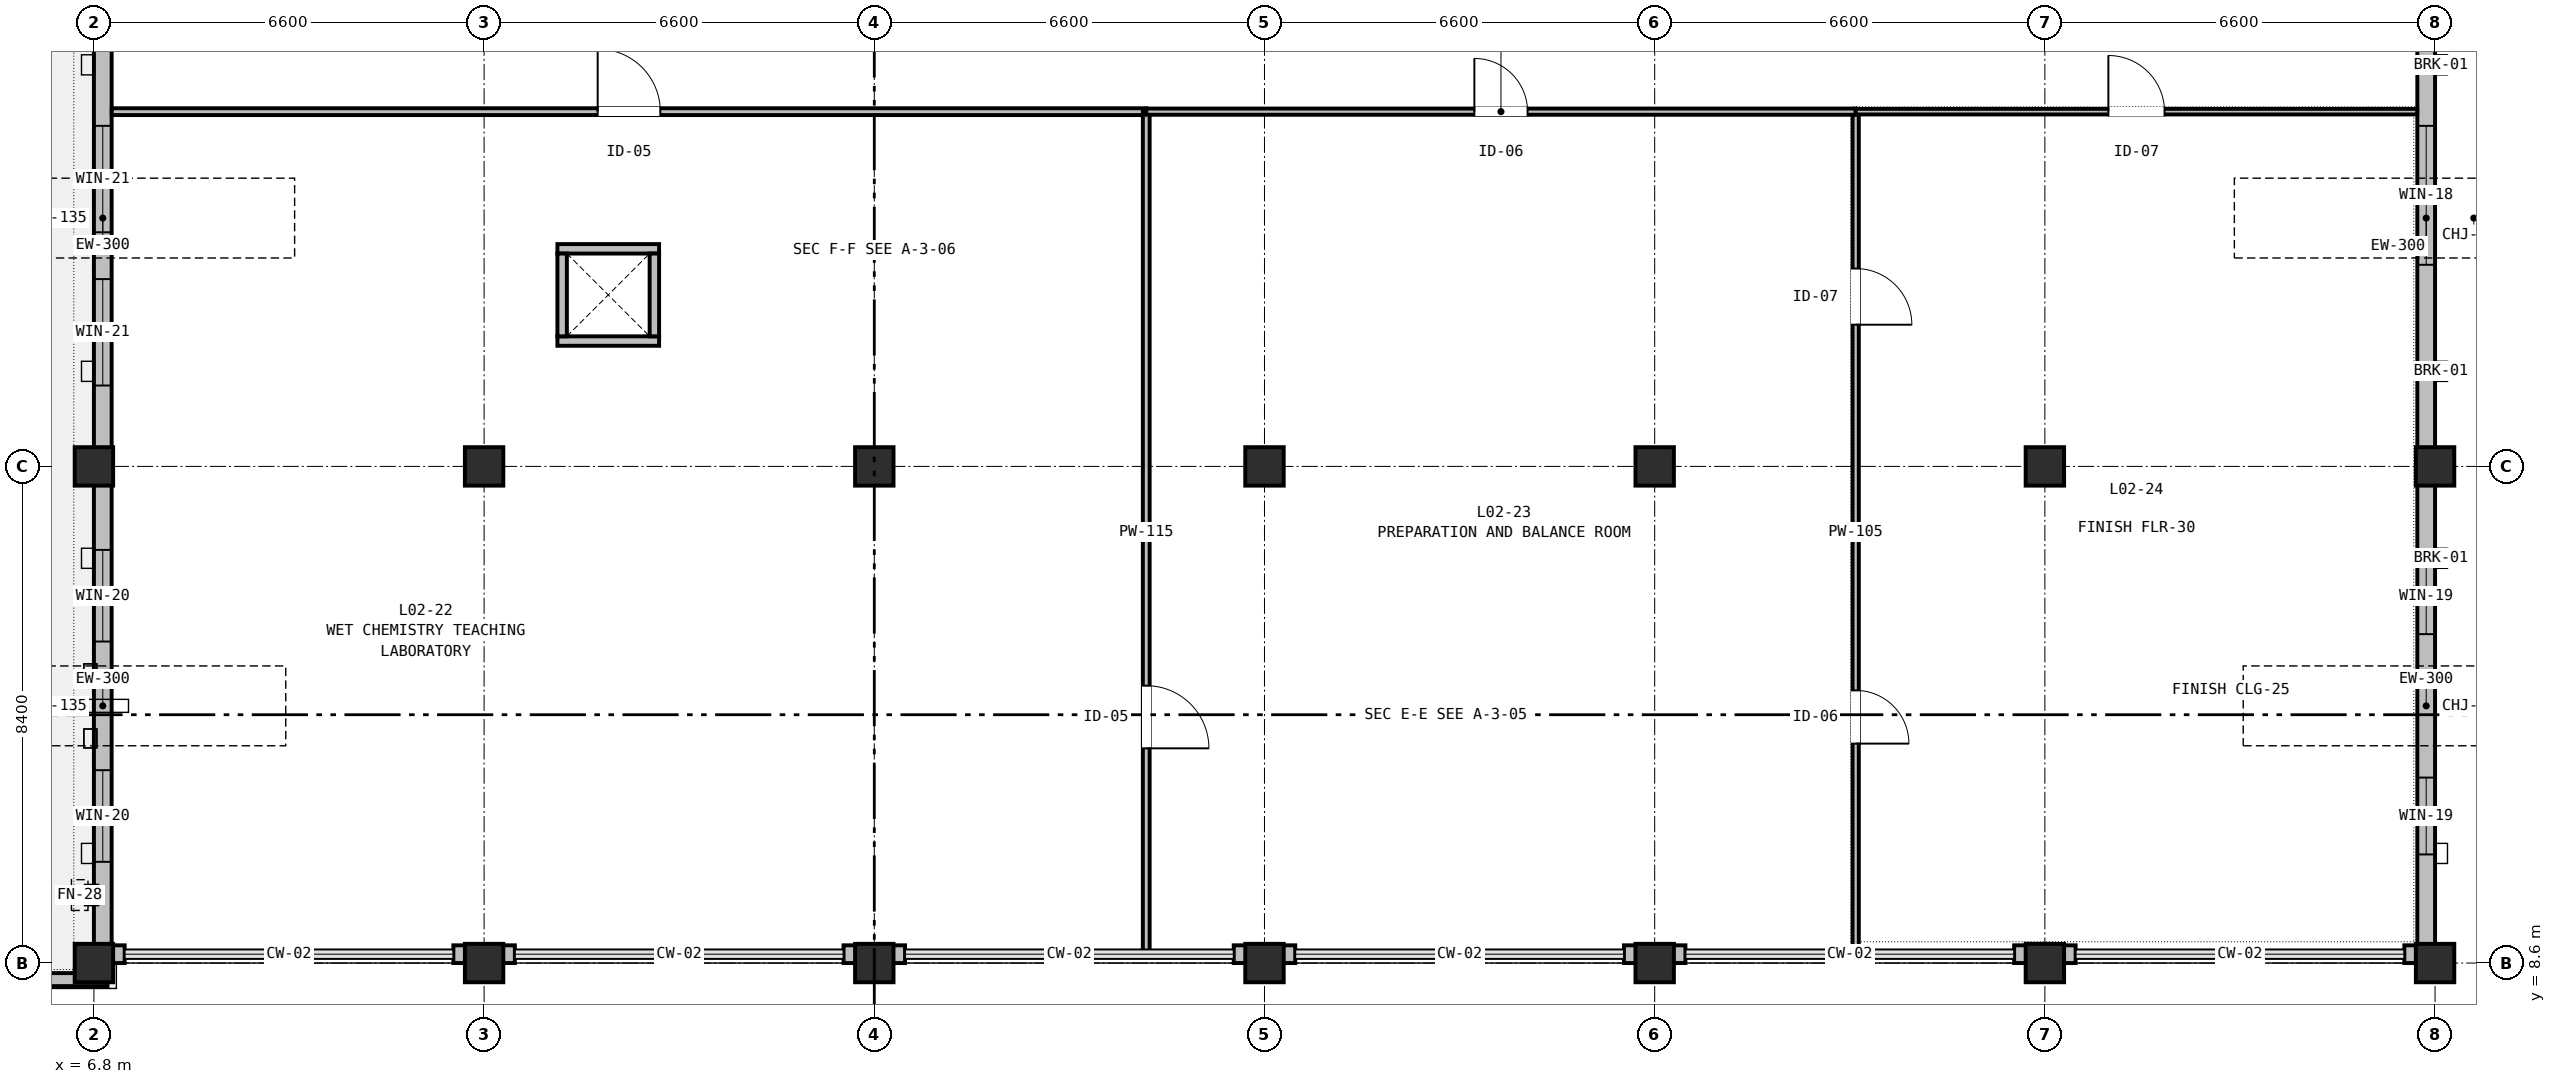
"""IFC4 building model, lengths in metres.
Left out: names, types, materials, properties, quantities, classifications, styles, units other than length and angle.
Written with IfcOpenShell. Run it as: python <this file> out.ifc"""

import sys

from ifc_helpers import new_model, si_unit, direction, frame, frame_2d, origin, origin_2d, place, context, subcontext, project, spatial, rectangle, extrude, element, fill, save


model = new_model("IFC4")
c1 = context("Model", 3, precision=1e-05, world=origin(), true_north=direction((0.0, 1.0)))
c2 = subcontext(c1, "Body", "Model", "MODEL_VIEW")
j1 = project(units=[si_unit("LENGTHUNIT", "METRE"), si_unit("PLANEANGLEUNIT", "RADIAN")], contexts=[c1])
p1 = place(None, origin())
s1 = spatial("IfcSite", under=j1, at=p1, CompositionType="ELEMENT")
p2 = place(p1, origin())
s2 = spatial("IfcBuilding", under=s1, at=p2, CompositionType="ELEMENT")
p3 = place(p2, frame((0.0, 0.0, 10.2)))
s3 = spatial("IfcBuildingStorey", under=s2, at=p3, CompositionType="ELEMENT", Elevation=10.2)
for number, where, z_axis, x_axis in (
    (1, (6.8, 8.6, 0.0), (0.0, 0.0, 1.0), (1.0, 0.0, 0.0)),
    (2, (6.8, 17.0, 0.0), (0.0, 0.0, 1.0), (1.0, 0.0, 0.0)),
    (3, (13.4, 8.6, 0.0), (0.0, 0.0, 1.0), (1.0, 0.0, 0.0)),
    (4, (13.4, 17.0, 0.0), (0.0, 0.0, 1.0), (1.0, 0.0, 0.0)),
    (5, (20.0, 8.6, 0.0), (0.0, 0.0, 1.0), (1.0, 0.0, 0.0)),
    (6, (20.0, 17.0, 0.0), (0.0, 0.0, 1.0), (1.0, 0.0, 0.0)),
    (7, (26.6, 8.6, 0.0), (0.0, 0.0, 1.0), (1.0, 0.0, 0.0)),
    (8, (26.6, 17.0, 0.0), (0.0, 0.0, 1.0), (1.0, 0.0, 0.0)),
    (9, (33.2, 8.6, 0.0), (0.0, 0.0, 1.0), (1.0, 0.0, 0.0)),
    (10, (33.2, 17.0, 0.0), (0.0, 0.0, 1.0), (1.0, 0.0, 0.0)),
    (11, (39.8, 8.6, 0.0), (0.0, 0.0, 1.0), (1.0, 0.0, 0.0)),
    (12, (39.8, 17.0, 0.0), (0.0, 0.0, 1.0), (1.0, 0.0, 0.0)),
):
    element("IfcColumn", number, at=place(p3, frame(where, z_axis=z_axis, x_axis=x_axis)), inside=s3, PredefinedType="COLUMN", context=c2, shape_type="SweptSolid", body=[
        extrude(rectangle(XDim=0.65, YDim=0.65, at=origin_2d()), origin(), (0.0, 0.0, 1.0), 4.8),
    ])
for number, where, z_axis, x_axis in (
    (13, (46.4, 8.6, 0.0), (0.0, 0.0, 1.0), (1.0, 0.0, 0.0)),
    (14, (46.4, 17.0, 0.0), (0.0, 0.0, 1.0), (1.0, 0.0, 0.0)),
):
    element("IfcColumn", number, at=place(p3, frame(where, z_axis=z_axis, x_axis=x_axis)), inside=s3, PredefinedType="COLUMN", context=c2, shape_type="SweptSolid", body=[
        extrude(rectangle(XDim=0.65, YDim=0.65, at=origin_2d()), origin(), (0.0, 0.0, 1.0), 4.74),
    ])
p4 = place(p3, frame((46.25, 25.4, 0.0), z_axis=(0.0, 0.0, 1.0), x_axis=(0.0, -1.0, 0.0)))
e15 = element("IfcWall", 15, at=p4, inside=s3, PredefinedType="STANDARD", context=c2, shape_type="SweptSolid", body=[
    extrude(rectangle(XDim=8.4, YDim=0.3, at=frame_2d((4.2, 0.0))), origin(), (0.0, 0.0, 1.0), 4.085),
])
p5 = place(p4, frame((2.64, 0.0, 0.9)))
e16 = element("IfcOpeningElement", 16, at=p5, cuts=e15, PredefinedType="OPENING", context=c2, shape_type="SweptSolid", body=[
    extrude(rectangle(XDim=2.35, YDim=1.5, at=frame_2d((1.175, 0.75))), frame((0.0, 0.16, 0.0), z_axis=(0.0, -1.0, 0.0), x_axis=(1.0, 0.0, 0.0)), (0.0, 0.0, 1.0), 0.32),
])
p6 = place(p3, frame((46.25, 17.0, 0.0), z_axis=(0.0, 0.0, 1.0), x_axis=(0.0, -1.0, 0.0)))
e17 = element("IfcWall", 17, at=p6, inside=s3, PredefinedType="STANDARD", context=c2, shape_type="SweptSolid", body=[
    extrude(rectangle(XDim=8.1, YDim=0.3, at=frame_2d((4.05, 0.0))), origin(), (0.0, 0.0, 1.0), 4.085),
])
p7 = place(p6, frame((1.537, 0.0, 0.75)))
e18 = element("IfcOpeningElement", 18, at=p7, cuts=e17, PredefinedType="OPENING", context=c2, shape_type="SweptSolid", body=[
    extrude(rectangle(XDim=1.3, YDim=2.4, at=frame_2d((0.65, 1.2))), frame((0.0, 0.16, 0.0), z_axis=(0.0, -1.0, 0.0), x_axis=(1.0, 0.0, 0.0)), (0.0, 0.0, 1.0), 0.32),
])
p8 = place(p6, frame((5.263, 0.0, 0.75)))
e19 = element("IfcOpeningElement", 19, at=p8, cuts=e17, PredefinedType="OPENING", context=c2, shape_type="SweptSolid", body=[
    extrude(rectangle(XDim=1.3, YDim=2.4, at=frame_2d((0.65, 1.2))), frame((0.0, 0.16, 0.0), z_axis=(0.0, -1.0, 0.0), x_axis=(1.0, 0.0, 0.0)), (0.0, 0.0, 1.0), 0.32),
])
for number, where, z_axis, x_axis in (
    (20, (46.4, 8.75, 0.0), (0.0, 0.0, 1.0), (-1.0, 0.0, 0.0)),
    (21, (40.32, 8.75, 0.0), (0.0, 0.0, 1.0), (-1.0, 0.0, 0.0)),
    (22, (39.8, 8.75, 0.0), (0.0, 0.0, 1.0), (-1.0, 0.0, 0.0)),
    (23, (33.72, 8.75, 0.0), (0.0, 0.0, 1.0), (-1.0, 0.0, 0.0)),
    (24, (33.2, 8.75, 0.0), (0.0, 0.0, 1.0), (-1.0, 0.0, 0.0)),
    (25, (27.12, 8.75, 0.0), (0.0, 0.0, 1.0), (-1.0, 0.0, 0.0)),
    (26, (26.6, 8.75, 0.0), (0.0, 0.0, 1.0), (-1.0, 0.0, 0.0)),
    (27, (20.52, 8.75, 0.0), (0.0, 0.0, 1.0), (-1.0, 0.0, 0.0)),
    (28, (20.0, 8.75, 0.0), (0.0, 0.0, 1.0), (-1.0, 0.0, 0.0)),
    (29, (13.92, 8.75, 0.0), (0.0, 0.0, 1.0), (-1.0, 0.0, 0.0)),
    (30, (13.4, 8.75, 0.0), (0.0, 0.0, 1.0), (-1.0, 0.0, 0.0)),
    (31, (7.32, 8.75, 0.0), (0.0, 0.0, 1.0), (-1.0, 0.0, 0.0)),
):
    element("IfcWall", number, at=place(p3, frame(where, z_axis=z_axis, x_axis=x_axis)), inside=s3, PredefinedType="STANDARD", context=c2, shape_type="SweptSolid", body=[
        extrude(rectangle(XDim=0.52, YDim=0.3, at=frame_2d((0.26, 0.0))), origin(), (0.0, 0.0, 1.0), 3.935),
    ])
p9 = place(p3, frame((6.95, 8.9, 0.0), z_axis=(0.0, 0.0, 1.0), x_axis=(0.0, 1.0, 0.0)))
e32 = element("IfcWall", 32, at=p9, inside=s3, PredefinedType="STANDARD", context=c2, shape_type="SweptSolid", body=[
    extrude(rectangle(XDim=8.1, YDim=0.3, at=frame_2d((4.05, 0.0))), origin(), (0.0, 0.0, 1.0), 4.085),
])
p10 = place(p9, frame((1.412, 0.0, 0.75)))
e33 = element("IfcOpeningElement", 33, at=p10, cuts=e32, PredefinedType="OPENING", context=c2, shape_type="SweptSolid", body=[
    extrude(rectangle(XDim=1.55, YDim=2.4, at=frame_2d((0.775, 1.2))), frame((0.0, 0.16, 0.0), z_axis=(0.0, -1.0, 0.0), x_axis=(1.0, 0.0, 0.0)), (0.0, 0.0, 1.0), 0.32),
])
p11 = place(p9, frame((5.138, 0.0, 0.75)))
e34 = element("IfcOpeningElement", 34, at=p11, cuts=e32, PredefinedType="OPENING", context=c2, shape_type="SweptSolid", body=[
    extrude(rectangle(XDim=1.55, YDim=2.4, at=frame_2d((0.775, 1.2))), frame((0.0, 0.16, 0.0), z_axis=(0.0, -1.0, 0.0), x_axis=(1.0, 0.0, 0.0)), (0.0, 0.0, 1.0), 0.32),
])
p12 = place(p3, frame((6.95, 17.0, 0.0), z_axis=(0.0, 0.0, 1.0), x_axis=(0.0, 1.0, 0.0)))
e35 = element("IfcWall", 35, at=p12, inside=s3, PredefinedType="STANDARD", context=c2, shape_type="SweptSolid", body=[
    extrude(rectangle(XDim=8.4, YDim=0.3, at=frame_2d((4.2, 0.0))), origin(), (0.0, 0.0, 1.0), 4.085),
])
p13 = place(p12, frame((1.368, 0.0, 0.75)))
e36 = element("IfcOpeningElement", 36, at=p13, cuts=e35, PredefinedType="OPENING", context=c2, shape_type="SweptSolid", body=[
    extrude(rectangle(XDim=1.8, YDim=2.4, at=frame_2d((0.9, 1.2))), frame((0.0, 0.16, 0.0), z_axis=(0.0, -1.0, 0.0), x_axis=(1.0, 0.0, 0.0)), (0.0, 0.0, 1.0), 0.32),
])
p14 = place(p12, frame((3.96, 0.0, 0.75)))
e37 = element("IfcOpeningElement", 37, at=p14, cuts=e35, PredefinedType="OPENING", context=c2, shape_type="SweptSolid", body=[
    extrude(rectangle(XDim=1.8, YDim=2.4, at=frame_2d((0.9, 1.2))), frame((0.0, 0.16, 0.0), z_axis=(0.0, -1.0, 0.0), x_axis=(1.0, 0.0, 0.0)), (0.0, 0.0, 1.0), 0.32),
])
p15 = place(p3, frame((7.03, 8.32, 0.0), z_axis=(0.0, 0.0, 1.0), x_axis=(-1.0, 0.0, 0.0)))
e38 = element("IfcWall", 38, at=p15, inside=s3, PredefinedType="PARAPET", context=c2, shape_type="SweptSolid", body=[
    extrude(rectangle(XDim=7.31, YDim=0.22, at=frame_2d((3.655, 0.0))), origin(), (0.0, 0.0, 1.0), 0.68),
])
for number, where, z_axis, x_axis in (
    (39, (14.64, 19.12, 0.0), (0.0, 0.0, 1.0), (1.0, 0.0, 0.0)),
    (40, (14.64, 20.68, 0.0), (0.0, 0.0, 1.0), (1.0, 0.0, 0.0)),
):
    element("IfcWall", number, at=place(p3, frame(where, z_axis=z_axis, x_axis=x_axis)), inside=s3, PredefinedType="PARTITIONING", context=c2, shape_type="SweptSolid", body=[
        extrude(rectangle(XDim=1.72, YDim=0.16, at=frame_2d((0.86, 0.0))), origin(), (0.0, 0.0, 1.0), 4.495),
    ])
for number, where, z_axis, x_axis in (
    (41, (14.72, 19.2, 0.0), (0.0, 0.0, 1.0), (0.0, 1.0, 0.0)),
    (42, (16.28, 19.2, 0.0), (0.0, 0.0, 1.0), (0.0, 1.0, 0.0)),
):
    element("IfcWall", number, at=place(p3, frame(where, z_axis=z_axis, x_axis=x_axis)), inside=s3, PredefinedType="PARTITIONING", context=c2, shape_type="SweptSolid", body=[
        extrude(rectangle(XDim=1.4, YDim=0.16, at=frame_2d((0.7, 0.0))), origin(), (0.0, 0.0, 1.0), 4.495),
    ])
p16 = place(p3, frame((7.102, 23.0, 0.0), z_axis=(0.0, 0.0, 1.0), x_axis=(1.0, 0.0, 0.0)))
e43 = element("IfcWall", 43, at=p16, inside=s3, PredefinedType="PARTITIONING", context=c2, shape_type="SweptSolid", body=[
    extrude(rectangle(XDim=17.498, YDim=0.115, at=frame_2d((8.749, 0.0))), origin(), (0.0, 0.0, 1.0), 3.935),
])
p17 = place(p16, frame((8.219, 0.0, 0.0)))
e44 = element("IfcOpeningElement", 44, at=p17, cuts=e43, PredefinedType="OPENING", context=c2, shape_type="SweptSolid", body=[
    extrude(rectangle(XDim=1.06, YDim=2.02, at=frame_2d((0.53, 1.01))), frame((0.0, 0.067, 0.0), z_axis=(0.0, -1.0, 0.0), x_axis=(1.0, 0.0, 0.0)), (0.0, 0.0, 1.0), 0.135),
])
p18 = place(p3, frame((24.6, 23.0, 0.0), z_axis=(0.0, 0.0, 1.0), x_axis=(0.0, -1.0, 0.0)))
e45 = element("IfcWall", 45, at=p18, inside=s3, PredefinedType="PARTITIONING", context=c2, shape_type="SweptSolid", body=[
    extrude(rectangle(XDim=14.22, YDim=0.115, at=frame_2d((7.11, 0.0))), origin(), (0.0, 0.0, 1.0), 4.085),
])
p19 = place(p18, frame((9.708, 0.0, 0.0)))
e46 = element("IfcOpeningElement", 46, at=p19, cuts=e45, PredefinedType="OPENING", context=c2, shape_type="SweptSolid", body=[
    extrude(rectangle(XDim=1.06, YDim=2.02, at=frame_2d((0.53, 1.01))), frame((0.0, 0.067, 0.0), z_axis=(0.0, -1.0, 0.0), x_axis=(1.0, 0.0, 0.0)), (0.0, 0.0, 1.0), 0.135),
])
p20 = place(p3, frame((36.6, 23.0, 0.0), z_axis=(0.0, 0.0, 1.0), x_axis=(0.0, -1.0, 0.0)))
e47 = element("IfcWall", 47, at=p20, inside=s3, PredefinedType="PARTITIONING", context=c2, shape_type="SweptSolid", body=[
    extrude(rectangle(XDim=14.22, YDim=0.105, at=frame_2d((7.11, 0.0))), origin(), (0.0, 0.0, 1.0), 4.085),
])
p21 = place(p20, frame((9.788, 0.0, 0.0)))
e48 = element("IfcOpeningElement", 48, at=p21, cuts=e47, PredefinedType="OPENING", context=c2, shape_type="SweptSolid", body=[
    extrude(rectangle(XDim=0.9, YDim=2.06, at=frame_2d((0.45, 1.03))), frame((0.0, 0.062, 0.0), z_axis=(0.0, -1.0, 0.0), x_axis=(1.0, 0.0, 0.0)), (0.0, 0.0, 1.0), 0.125),
])
p22 = place(p20, frame((2.653, 0.0, 0.0)))
e49 = element("IfcOpeningElement", 49, at=p22, cuts=e47, PredefinedType="OPENING", context=c2, shape_type="SweptSolid", body=[
    extrude(rectangle(XDim=0.95, YDim=2.06, at=frame_2d((0.475, 1.03))), frame((0.0, 0.062, 0.0), z_axis=(0.0, -1.0, 0.0), x_axis=(1.0, 0.0, 0.0)), (0.0, 0.0, 1.0), 0.125),
])
p23 = place(p3, frame((24.6, 23.0, 0.0), z_axis=(0.0, 0.0, 1.0), x_axis=(1.0, 0.0, 0.0)))
e50 = element("IfcWall", 50, at=p23, inside=s3, PredefinedType="PARTITIONING", context=c2, shape_type="SweptSolid", body=[
    extrude(rectangle(XDim=12.0, YDim=0.105, at=frame_2d((6.0, 0.0))), origin(), (0.0, 0.0, 1.0), 3.935),
])
p24 = place(p23, frame((5.55, 0.0, 0.0)))
e51 = element("IfcOpeningElement", 51, at=p24, cuts=e50, PredefinedType="OPENING", context=c2, shape_type="SweptSolid", body=[
    extrude(rectangle(XDim=0.9, YDim=2.06, at=frame_2d((0.45, 1.03))), frame((0.0, 0.062, 0.0), z_axis=(0.0, -1.0, 0.0), x_axis=(1.0, 0.0, 0.0)), (0.0, 0.0, 1.0), 0.125),
])
p25 = place(p3, frame((36.6, 23.0, 0.0), z_axis=(0.0, 0.0, 1.0), x_axis=(1.0, 0.0, 0.0)))
e52 = element("IfcWall", 52, at=p25, inside=s3, PredefinedType="PARTITIONING", context=c2, shape_type="SweptSolid", body=[
    extrude(rectangle(XDim=9.498, YDim=0.095, at=frame_2d((4.749, 0.0))), origin(), (0.0, 0.0, 1.0), 3.935),
])
p26 = place(p25, frame((4.274, 0.0, 0.0)))
e53 = element("IfcOpeningElement", 53, at=p26, cuts=e52, PredefinedType="OPENING", context=c2, shape_type="SweptSolid", body=[
    extrude(rectangle(XDim=0.95, YDim=2.06, at=frame_2d((0.475, 1.03))), frame((0.0, 0.057, 0.0), z_axis=(0.0, -1.0, 0.0), x_axis=(1.0, 0.0, 0.0)), (0.0, 0.0, 1.0), 0.115),
])
p27 = place(p5, origin())
e54 = element("IfcWindow", 54, at=p27, inside=s3, PartitioningType="SINGLE_PANEL", PredefinedType="WINDOW", context=c2, shape_type="SweptSolid", body=[
    extrude(rectangle(XDim=2.35, YDim=1.5, at=frame_2d((1.175, 0.75))), frame((0.0, 0.03, 0.0), z_axis=(0.0, -1.0, 0.0), x_axis=(1.0, 0.0, 0.0)), (0.0, 0.0, 1.0), 0.06),
])
fill(e16, e54)
p28 = place(p7, origin())
e55 = element("IfcWindow", 55, at=p28, inside=s3, PartitioningType="SINGLE_PANEL", PredefinedType="WINDOW", context=c2, shape_type="SweptSolid", body=[
    extrude(rectangle(XDim=1.3, YDim=2.4, at=frame_2d((0.65, 1.2))), frame((0.0, 0.03, 0.0), z_axis=(0.0, -1.0, 0.0), x_axis=(1.0, 0.0, 0.0)), (0.0, 0.0, 1.0), 0.06),
])
fill(e18, e55)
p29 = place(p8, origin())
e56 = element("IfcWindow", 56, at=p29, inside=s3, PartitioningType="SINGLE_PANEL", PredefinedType="WINDOW", context=c2, shape_type="SweptSolid", body=[
    extrude(rectangle(XDim=1.3, YDim=2.4, at=frame_2d((0.65, 1.2))), frame((0.0, 0.03, 0.0), z_axis=(0.0, -1.0, 0.0), x_axis=(1.0, 0.0, 0.0)), (0.0, 0.0, 1.0), 0.06),
])
fill(e19, e56)
p30 = place(p10, origin())
e57 = element("IfcWindow", 57, at=p30, inside=s3, PartitioningType="SINGLE_PANEL", PredefinedType="WINDOW", context=c2, shape_type="SweptSolid", body=[
    extrude(rectangle(XDim=1.55, YDim=2.4, at=frame_2d((0.775, 1.2))), frame((0.0, 0.03, 0.0), z_axis=(0.0, -1.0, 0.0), x_axis=(1.0, 0.0, 0.0)), (0.0, 0.0, 1.0), 0.06),
])
fill(e33, e57)
p31 = place(p11, origin())
e58 = element("IfcWindow", 58, at=p31, inside=s3, PartitioningType="SINGLE_PANEL", PredefinedType="WINDOW", context=c2, shape_type="SweptSolid", body=[
    extrude(rectangle(XDim=1.55, YDim=2.4, at=frame_2d((0.775, 1.2))), frame((0.0, 0.03, 0.0), z_axis=(0.0, -1.0, 0.0), x_axis=(1.0, 0.0, 0.0)), (0.0, 0.0, 1.0), 0.06),
])
fill(e34, e58)
p32 = place(p13, origin())
e59 = element("IfcWindow", 59, at=p32, inside=s3, PartitioningType="SINGLE_PANEL", PredefinedType="WINDOW", context=c2, shape_type="SweptSolid", body=[
    extrude(rectangle(XDim=1.8, YDim=2.4, at=frame_2d((0.9, 1.2))), frame((0.0, 0.03, 0.0), z_axis=(0.0, -1.0, 0.0), x_axis=(1.0, 0.0, 0.0)), (0.0, 0.0, 1.0), 0.06),
])
fill(e36, e59)
p33 = place(p14, origin())
e60 = element("IfcWindow", 60, at=p33, inside=s3, PartitioningType="SINGLE_PANEL", PredefinedType="WINDOW", context=c2, shape_type="SweptSolid", body=[
    extrude(rectangle(XDim=1.8, YDim=2.4, at=frame_2d((0.9, 1.2))), frame((0.0, 0.03, 0.0), z_axis=(0.0, -1.0, 0.0), x_axis=(1.0, 0.0, 0.0)), (0.0, 0.0, 1.0), 0.06),
])
fill(e37, e60)
p34 = place(p17, origin())
e61 = element("IfcDoor", 61, at=p34, inside=s3, OperationType="SINGLE_SWING_LEFT", PredefinedType="DOOR", context=c2, shape_type="SweptSolid", body=[
    extrude(rectangle(XDim=1.06, YDim=2.02, at=frame_2d((0.53, 1.01))), frame((0.0, 0.025, 0.0), z_axis=(0.0, -1.0, 0.0), x_axis=(1.0, 0.0, 0.0)), (0.0, 0.0, 1.0), 0.05),
])
fill(e44, e61)
p35 = place(p19, origin())
e62 = element("IfcDoor", 62, at=p35, inside=s3, OperationType="SINGLE_SWING_RIGHT", PredefinedType="DOOR", context=c2, shape_type="SweptSolid", body=[
    extrude(rectangle(XDim=1.06, YDim=2.02, at=frame_2d((0.53, 1.01))), frame((0.0, 0.025, 0.0), z_axis=(0.0, -1.0, 0.0), x_axis=(1.0, 0.0, 0.0)), (0.0, 0.0, 1.0), 0.05),
])
fill(e46, e62)
p36 = place(p24, origin())
e63 = element("IfcDoor", 63, at=p36, inside=s3, OperationType="SINGLE_SWING_LEFT", PredefinedType="DOOR", context=c2, shape_type="SweptSolid", body=[
    extrude(rectangle(XDim=0.9, YDim=2.06, at=frame_2d((0.45, 1.03))), frame((0.0, 0.025, 0.0), z_axis=(0.0, -1.0, 0.0), x_axis=(1.0, 0.0, 0.0)), (0.0, 0.0, 1.0), 0.05),
])
fill(e51, e63)
p37 = place(p21, origin())
e64 = element("IfcDoor", 64, at=p37, inside=s3, OperationType="SINGLE_SWING_RIGHT", PredefinedType="DOOR", context=c2, shape_type="SweptSolid", body=[
    extrude(rectangle(XDim=0.9, YDim=2.06, at=frame_2d((0.45, 1.03))), frame((0.0, 0.025, 0.0), z_axis=(0.0, -1.0, 0.0), x_axis=(1.0, 0.0, 0.0)), (0.0, 0.0, 1.0), 0.05),
])
fill(e48, e64)
p38 = place(p26, origin())
e65 = element("IfcDoor", 65, at=p38, inside=s3, OperationType="SINGLE_SWING_LEFT", PredefinedType="DOOR", context=c2, shape_type="SweptSolid", body=[
    extrude(rectangle(XDim=0.95, YDim=2.06, at=frame_2d((0.475, 1.03))), frame((0.0, 0.025, 0.0), z_axis=(0.0, -1.0, 0.0), x_axis=(1.0, 0.0, 0.0)), (0.0, 0.0, 1.0), 0.05),
])
fill(e53, e65)
p39 = place(p22, origin())
e66 = element("IfcDoor", 66, at=p39, inside=s3, OperationType="SINGLE_SWING_RIGHT", PredefinedType="DOOR", context=c2, shape_type="SweptSolid", body=[
    extrude(rectangle(XDim=0.95, YDim=2.06, at=frame_2d((0.475, 1.03))), frame((0.0, 0.025, 0.0), z_axis=(0.0, -1.0, 0.0), x_axis=(1.0, 0.0, 0.0)), (0.0, 0.0, 1.0), 0.05),
])
fill(e49, e66)
save(model, sys.argv[1])
